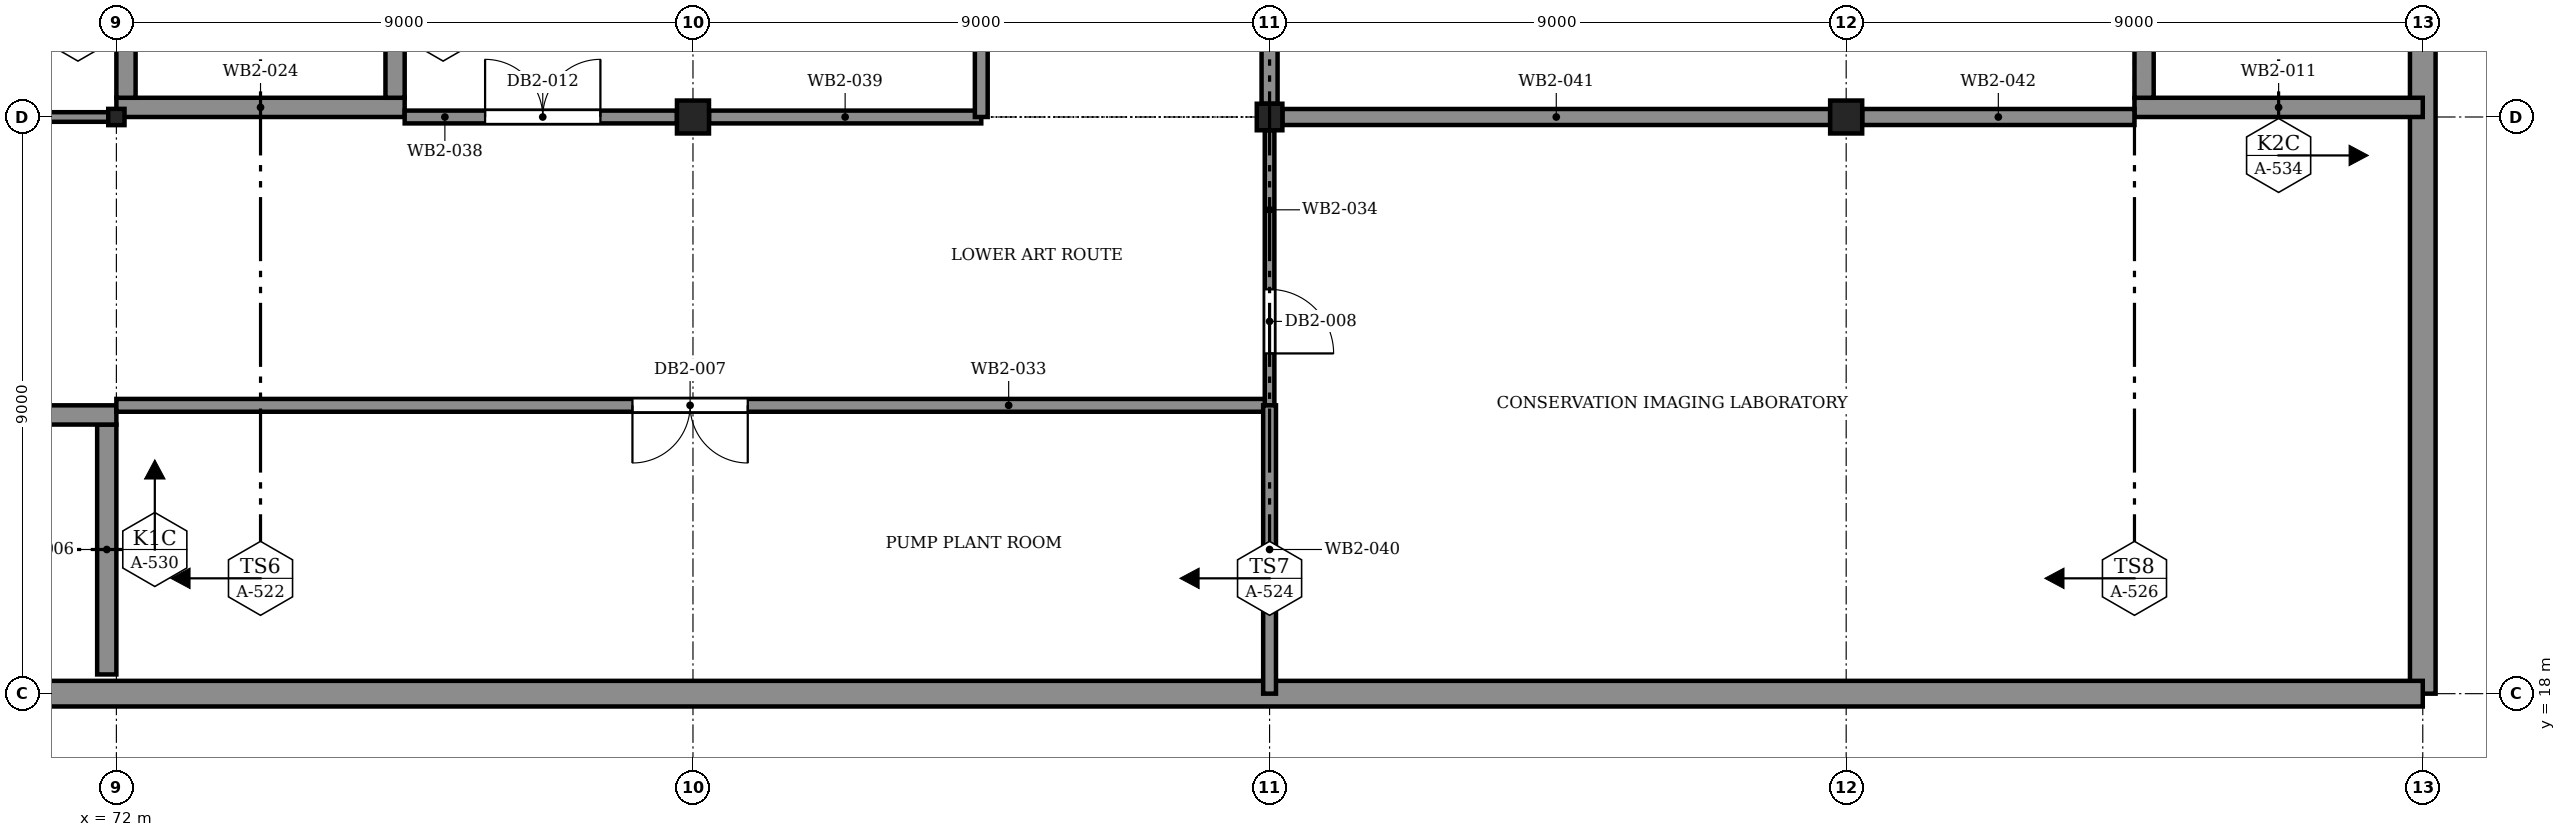
"""IFC4 building model, lengths in metres.
Left out: names, types, materials, properties, quantities, classifications, styles, units other than length and angle.
Written with IfcOpenShell. Run it as: python <this file> out.ifc"""

import sys

from ifc_helpers import new_model, si_unit, direction, frame, frame_2d, origin, origin_2d, place, context, subcontext, project, spatial, rectangle, i_section, extrude, element, fill, save


model = new_model("IFC4")
c1 = context("Model", 3, precision=1e-05, world=origin(), true_north=direction((0.0, 1.0)))
c2 = subcontext(c1, "Body", "Model", "MODEL_VIEW")
j1 = project(units=[si_unit("LENGTHUNIT", "METRE"), si_unit("PLANEANGLEUNIT", "RADIAN")], contexts=[c1])
p1 = place(None, origin())
s1 = spatial("IfcSite", under=j1, at=p1, CompositionType="ELEMENT")
p2 = place(p1, origin())
s2 = spatial("IfcBuilding", under=s1, at=p2, CompositionType="ELEMENT")
p3 = place(p2, frame((0.0, 0.0, -9.6)))
s3 = spatial("IfcBuildingStorey", under=s2, at=p3, CompositionType="ELEMENT", Elevation=-9.6)
p4 = place(p3, frame((108.0, 18.0, 0.0), z_axis=(0.0, 0.0, 1.0), x_axis=(0.0, 1.0, 0.0)))
e1 = element("IfcWall", 1, at=p4, inside=s3, PredefinedType="SOLIDWALL", context=c2, shape_type="SweptSolid", body=[
    extrude(rectangle(XDim=45.0, YDim=0.4, at=frame_2d((22.5, 0.0))), origin(), (0.0, 0.0, 1.0), 4.8),
])
p5 = place(p3, frame((27.0, 18.0, 0.0), z_axis=(0.0, 0.0, 1.0), x_axis=(1.0, 0.0, 0.0)))
e2 = element("IfcWall", 2, at=p5, inside=s3, PredefinedType="SOLIDWALL", context=c2, shape_type="SweptSolid", body=[
    extrude(rectangle(XDim=81.0, YDim=0.4, at=frame_2d((40.5, 0.0))), origin(), (0.0, 0.0, 1.0), 4.8),
])
p6 = place(p3, frame((72.0, 27.0, -0.6), z_axis=(0.0, 0.0, 1.0), x_axis=(1.0, 0.0, 0.0)))
e3 = element("IfcColumn", 3, at=p6, inside=s3, PredefinedType="COLUMN", context=c2, shape_type="SweptSolid", body=[
    extrude(i_section(OverallWidth=0.254, OverallDepth=0.254, WebThickness=0.009, FlangeThickness=0.014, FilletRadius=0.014, at=origin_2d()), origin(), (0.0, 0.0, 1.0), 5.4),
])
p7 = place(p3, frame((81.0, 27.0, -0.6), z_axis=(0.0, 0.0, 1.0), x_axis=(1.0, 0.0, 0.0)))
e4 = element("IfcColumn", 4, at=p7, inside=s3, PredefinedType="COLUMN", context=c2, shape_type="SweptSolid", body=[
    extrude(i_section(OverallWidth=0.5, OverallDepth=0.514, WebThickness=0.025, FlangeThickness=0.032, at=origin_2d()), origin(), (0.0, 0.0, 1.0), 5.4),
])
p8 = place(p3, frame((90.0, 27.0, -0.6), z_axis=(0.0, 0.0, 1.0), x_axis=(1.0, 0.0, 0.0)))
e5 = element("IfcColumn", 5, at=p8, inside=s3, PredefinedType="COLUMN", context=c2, shape_type="SweptSolid", body=[
    extrude(i_section(OverallWidth=0.4, OverallDepth=0.414, WebThickness=0.025, FlangeThickness=0.032, at=origin_2d()), origin(), (0.0, 0.0, 1.0), 5.4),
])
p9 = place(p3, frame((99.0, 27.0, -0.6), z_axis=(0.0, 0.0, 1.0), x_axis=(1.0, 0.0, 0.0)))
e6 = element("IfcColumn", 6, at=p9, inside=s3, PredefinedType="COLUMN", context=c2, shape_type="SweptSolid", body=[
    extrude(i_section(OverallWidth=0.5, OverallDepth=0.514, WebThickness=0.025, FlangeThickness=0.032, at=origin_2d()), origin(), (0.0, 0.0, 1.0), 5.4),
])
p10 = place(p3, frame((71.85, 18.3, 0.0), z_axis=(0.0, 0.0, 1.0), x_axis=(0.0, 1.0, 0.0)))
e7 = element("IfcWall", 7, at=p10, inside=s3, PredefinedType="SOLIDWALL", context=c2, shape_type="SweptSolid", body=[
    extrude(rectangle(XDim=3.9, YDim=0.3, at=frame_2d((1.95, 0.0))), origin(), (0.0, 0.0, 1.0), 4.8),
])
p11 = place(p3, frame((63.0, 22.35, 0.0), z_axis=(0.0, 0.0, 1.0), x_axis=(1.0, 0.0, 0.0)))
e8 = element("IfcWall", 8, at=p11, inside=s3, PredefinedType="SOLIDWALL", context=c2, shape_type="SweptSolid", body=[
    extrude(rectangle(XDim=9.0, YDim=0.3, at=frame_2d((4.5, 0.0))), origin(), (0.0, 0.0, 1.0), 4.8),
])
p12 = place(p3, frame((103.5, 27.15, 0.0), z_axis=(0.0, 0.0, 1.0), x_axis=(1.0, 0.0, 0.0)))
e9 = element("IfcWall", 9, at=p12, inside=s3, PredefinedType="SOLIDWALL", context=c2, shape_type="SweptSolid", body=[
    extrude(rectangle(XDim=4.5, YDim=0.3, at=frame_2d((2.25, 0.0))), origin(), (0.0, 0.0, 1.0), 4.8),
])
p13 = place(p3, frame((103.65, 27.3, 0.0), z_axis=(0.0, 0.0, 1.0), x_axis=(0.0, 1.0, 0.0)))
e10 = element("IfcWall", 10, at=p13, inside=s3, PredefinedType="SOLIDWALL", context=c2, shape_type="SweptSolid", body=[
    extrude(rectangle(XDim=8.4, YDim=0.3, at=frame_2d((4.2, 0.0))), origin(), (0.0, 0.0, 1.0), 4.8),
])
p14 = place(p3, frame((72.0, 27.15, 0.0), z_axis=(0.0, 0.0, 1.0), x_axis=(1.0, 0.0, 0.0)))
e11 = element("IfcWall", 11, at=p14, inside=s3, PredefinedType="SOLIDWALL", context=c2, shape_type="SweptSolid", body=[
    extrude(rectangle(XDim=4.5, YDim=0.3, at=frame_2d((2.25, 0.0))), origin(), (0.0, 0.0, 1.0), 4.8),
])
for number, where, z_axis, x_axis in (
    (12, (76.35, 27.3, 0.0), (0.0, 0.0, 1.0), (0.0, 1.0, 0.0)),
    (13, (72.15, 27.3, 0.0), (0.0, 0.0, 1.0), (0.0, 1.0, 0.0)),
):
    element("IfcWall", number, at=place(p3, frame(where, z_axis=z_axis, x_axis=x_axis)), inside=s3, PredefinedType="SOLIDWALL", context=c2, shape_type="SweptSolid", body=[
        extrude(rectangle(XDim=8.4, YDim=0.3, at=frame_2d((4.2, 0.0))), origin(), (0.0, 0.0, 1.0), 4.8),
    ])
p15 = place(p3, frame((72.0, 22.5, 0.0), z_axis=(0.0, 0.0, 1.0), x_axis=(1.0, 0.0, 0.0)))
e14 = element("IfcWall", 14, at=p15, inside=s3, PredefinedType="PARTITIONING", context=c2, shape_type="SweptSolid", body=[
    extrude(rectangle(XDim=18.0, YDim=0.2, at=frame_2d((9.0, 0.0))), origin(), (0.0, 0.0, 1.0), 3.758),
])
p16 = place(p15, frame((8.055, 0.0, 0.0)))
e15 = element("IfcOpeningElement", 15, at=p16, cuts=e14, PredefinedType="OPENING", context=c2, shape_type="SweptSolid", body=[
    extrude(rectangle(XDim=1.8, YDim=2.1, at=frame_2d((0.9, 1.05))), frame((0.0, 0.11, 0.0), z_axis=(0.0, -1.0, 0.0), x_axis=(1.0, 0.0, 0.0)), (0.0, 0.0, 1.0), 0.22),
])
p17 = place(p3, frame((90.0, 22.5, 0.0), z_axis=(0.0, 0.0, 1.0), x_axis=(0.0, 1.0, 0.0)))
e16 = element("IfcWall", 16, at=p17, inside=s3, PredefinedType="PARTITIONING", context=c2, shape_type="SweptSolid", body=[
    extrude(rectangle(XDim=4.293, YDim=0.15, at=frame_2d((2.146, 0.0))), origin(), (0.0, 0.0, 1.0), 3.758),
])
p18 = place(p17, frame((0.81, 0.0, 0.0)))
e17 = element("IfcOpeningElement", 17, at=p18, cuts=e16, PredefinedType="OPENING", context=c2, shape_type="SweptSolid", body=[
    extrude(rectangle(XDim=1.0, YDim=2.1, at=frame_2d((0.5, 1.05))), frame((0.0, 0.085, 0.0), z_axis=(0.0, -1.0, 0.0), x_axis=(1.0, 0.0, 0.0)), (0.0, 0.0, 1.0), 0.17),
])
p19 = place(p3, frame((63.2, 27.0, 0.0), z_axis=(0.0, 0.0, 1.0), x_axis=(1.0, 0.0, 0.0)))
e18 = element("IfcWall", 18, at=p19, inside=s3, PredefinedType="PARTITIONING", context=c2, shape_type="SweptSolid", body=[
    extrude(rectangle(XDim=8.8, YDim=0.15, at=frame_2d((4.4, 0.0))), origin(), (0.0, 0.0, 1.0), 3.758),
])
p20 = place(p19, frame((3.85, 0.0, 0.0)))
e19 = element("IfcOpeningElement", 19, at=p20, cuts=e18, PredefinedType="OPENING", context=c2, shape_type="SweptSolid", body=[
    extrude(rectangle(XDim=1.0, YDim=2.1, at=frame_2d((0.5, 1.05))), frame((0.0, 0.085, 0.0), z_axis=(0.0, -1.0, 0.0), x_axis=(1.0, 0.0, 0.0)), (0.0, 0.0, 1.0), 0.17),
])
p21 = place(p3, frame((76.5, 27.0, 0.0), z_axis=(0.0, 0.0, 1.0), x_axis=(1.0, 0.0, 0.0)))
e20 = element("IfcWall", 20, at=p21, inside=s3, PredefinedType="PARTITIONING", context=c2, shape_type="SweptSolid", body=[
    extrude(rectangle(XDim=4.25, YDim=0.2, at=frame_2d((2.125, 0.0))), origin(), (0.0, 0.0, 1.0), 3.758),
])
p22 = place(p21, frame((1.255, 0.0, 0.0)))
e21 = element("IfcOpeningElement", 21, at=p22, cuts=e20, PredefinedType="OPENING", context=c2, shape_type="SweptSolid", body=[
    extrude(rectangle(XDim=1.8, YDim=2.1, at=frame_2d((0.9, 1.05))), frame((0.0, 0.11, 0.0), z_axis=(0.0, -1.0, 0.0), x_axis=(1.0, 0.0, 0.0)), (0.0, 0.0, 1.0), 0.22),
])
p23 = place(p3, frame((81.25, 27.0, 0.0), z_axis=(0.0, 0.0, 1.0), x_axis=(1.0, 0.0, 0.0)))
e22 = element("IfcWall", 22, at=p23, inside=s3, PredefinedType="PARTITIONING", context=c2, shape_type="SweptSolid", body=[
    extrude(rectangle(XDim=4.25, YDim=0.2, at=frame_2d((2.125, 0.0))), origin(), (0.0, 0.0, 1.0), 3.758),
])
p24 = place(p3, frame((90.0, 18.0, 0.0), z_axis=(0.0, 0.0, 1.0), x_axis=(0.0, 1.0, 0.0)))
e23 = element("IfcWall", 23, at=p24, inside=s3, PredefinedType="PARTITIONING", context=c2, shape_type="SweptSolid", body=[
    extrude(rectangle(XDim=4.5, YDim=0.2, at=frame_2d((2.25, 0.0))), origin(), (0.0, 0.0, 1.0), 3.758),
])
p25 = place(p3, frame((90.2, 27.0, 0.0), z_axis=(0.0, 0.0, 1.0), x_axis=(1.0, 0.0, 0.0)))
e24 = element("IfcWall", 24, at=p25, inside=s3, PredefinedType="PARTITIONING", context=c2, shape_type="SweptSolid", body=[
    extrude(rectangle(XDim=8.55, YDim=0.25, at=frame_2d((4.275, 0.0))), origin(), (0.0, 0.0, 1.0), 3.758),
])
p26 = place(p3, frame((99.25, 27.0, 0.0), z_axis=(0.0, 0.0, 1.0), x_axis=(1.0, 0.0, 0.0)))
e25 = element("IfcWall", 25, at=p26, inside=s3, PredefinedType="PARTITIONING", context=c2, shape_type="SweptSolid", body=[
    extrude(rectangle(XDim=4.25, YDim=0.25, at=frame_2d((2.125, 0.0))), origin(), (0.0, 0.0, 1.0), 3.758),
])
p27 = place(p3, frame((85.5, 27.0, 0.0), z_axis=(0.0, 0.0, 1.0), x_axis=(0.0, 1.0, 0.0)))
e26 = element("IfcWall", 26, at=p27, inside=s3, PredefinedType="PARTITIONING", context=c2, shape_type="SweptSolid", body=[
    extrude(rectangle(XDim=9.0, YDim=0.2, at=frame_2d((4.5, 0.0))), origin(), (0.0, 0.0, 1.0), 3.758),
])
p28 = place(p3, frame((90.0, 27.207, 0.0), z_axis=(0.0, 0.0, 1.0), x_axis=(0.0, 1.0, 0.0)))
e27 = element("IfcWall", 27, at=p28, inside=s3, PredefinedType="PARTITIONING", context=c2, shape_type="SweptSolid", body=[
    extrude(rectangle(XDim=8.586, YDim=0.25, at=frame_2d((4.293, 0.0))), origin(), (0.0, 0.0, 1.0), 3.758),
])
p29 = place(p16, frame((1.8, 0.0, 0.0), z_axis=(0.0, 0.0, 1.0), x_axis=(-1.0, 0.0, 0.0)))
e28 = element("IfcDoor", 28, at=p29, inside=s3, OperationType="DOUBLE_DOOR_SINGLE_SWING", PredefinedType="DOOR", context=c2, shape_type="SweptSolid", body=[
    extrude(rectangle(XDim=1.8, YDim=2.1, at=frame_2d((0.9, 1.05))), frame((0.0, 0.025, 0.0), z_axis=(0.0, -1.0, 0.0), x_axis=(1.0, 0.0, 0.0)), (0.0, 0.0, 1.0), 0.05),
])
fill(e15, e28)
p30 = place(p18, frame((1.0, 0.0, 0.0), z_axis=(0.0, 0.0, 1.0), x_axis=(-1.0, 0.0, 0.0)))
e29 = element("IfcDoor", 29, at=p30, inside=s3, OperationType="SINGLE_SWING_LEFT", PredefinedType="DOOR", context=c2, shape_type="SweptSolid", body=[
    extrude(rectangle(XDim=1.0, YDim=2.1, at=frame_2d((0.5, 1.05))), frame((0.0, 0.025, 0.0), z_axis=(0.0, -1.0, 0.0), x_axis=(1.0, 0.0, 0.0)), (0.0, 0.0, 1.0), 0.05),
])
fill(e17, e29)
p31 = place(p22, origin())
e30 = element("IfcDoor", 30, at=p31, inside=s3, OperationType="DOUBLE_DOOR_SINGLE_SWING", PredefinedType="DOOR", context=c2, shape_type="SweptSolid", body=[
    extrude(rectangle(XDim=1.8, YDim=2.1, at=frame_2d((0.9, 1.05))), frame((0.0, 0.025, 0.0), z_axis=(0.0, -1.0, 0.0), x_axis=(1.0, 0.0, 0.0)), (0.0, 0.0, 1.0), 0.05),
])
fill(e21, e30)
save(model, sys.argv[1])
